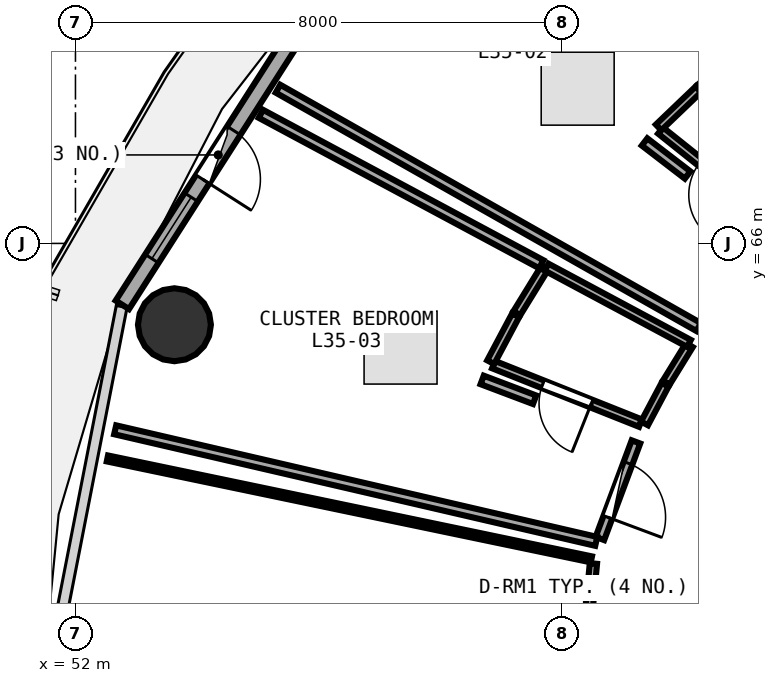
"""IFC4 building model, lengths in metres.
Left out: names, types, materials, properties, quantities, classifications, styles, units other than length and angle.
Written with IfcOpenShell. Run it as: python <this file> out.ifc"""

import sys

from ifc_helpers import new_model, si_unit, direction, frame, frame_2d, origin, origin_2d, place, context, subcontext, project, spatial, rectangle, circle, extrude, element, fill, save


model = new_model("IFC4")
c1 = context("Model", 3, precision=1e-05, world=origin(), true_north=direction((0.0, 1.0)))
c2 = subcontext(c1, "Body", "Model", "MODEL_VIEW")
j1 = project(units=[si_unit("LENGTHUNIT", "METRE"), si_unit("PLANEANGLEUNIT", "RADIAN")], contexts=[c1])
p1 = place(None, origin())
s1 = spatial("IfcSite", under=j1, at=p1, CompositionType="ELEMENT")
p2 = place(p1, origin())
s2 = spatial("IfcBuilding", under=s1, at=p2, CompositionType="ELEMENT")
p3 = place(p2, frame((0.0, 0.0, 139.35)))
s3 = spatial("IfcBuildingStorey", under=s2, at=p3, CompositionType="ELEMENT", Elevation=139.35)
p4 = place(p3, frame((53.627, 64.663, 0.0), z_axis=(0.0, 0.0, 1.0), x_axis=(1.0, 0.0, 0.0)))
e1 = element("IfcColumn", 1, at=p4, inside=s3, PredefinedType="COLUMN", context=c2, shape_type="SweptSolid", body=[
    extrude(circle(Radius=0.6, at=origin_2d()), origin(), (0.0, 0.0, 1.0), 3.75),
])
p5 = place(p3, frame((56.679, 71.1, 0.0), z_axis=(0.0, 0.0, 1.0), x_axis=(-0.538801521808, -0.842432739213, 0.0)))
e2 = element("IfcWall", 2, at=p5, inside=s3, PredefinedType="SOLIDWALL", context=c2, shape_type="SweptSolid", body=[
    extrude(rectangle(XDim=7.253, YDim=0.26, at=frame_2d((3.627, 0.0))), origin(), (0.0, 0.0, 1.0), 3.475),
])
p6 = place(p5, frame((3.852, 0.0, 0.0)))
e3 = element("IfcOpeningElement", 3, at=p6, cuts=e2, PredefinedType="OPENING", context=c2, shape_type="SweptSolid", body=[
    extrude(rectangle(XDim=0.95, YDim=2.1, at=frame_2d((0.475, 1.05))), frame((0.0, 0.14, 0.0), z_axis=(0.0, -1.0, 0.0), x_axis=(1.0, 0.0, 0.0)), (0.0, 0.0, 1.0), 0.28),
])
p7 = place(p5, frame((5.152, 0.0, 0.85)))
e4 = element("IfcOpeningElement", 4, at=p7, cuts=e2, PredefinedType="OPENING", context=c2, shape_type="SweptSolid", body=[
    extrude(rectangle(XDim=1.2, YDim=1.45, at=frame_2d((0.6, 0.725))), frame((0.0, 0.14, 0.0), z_axis=(0.0, -1.0, 0.0), x_axis=(1.0, 0.0, 0.0)), (0.0, 0.0, 1.0), 0.28),
])
p8 = place(p3, frame((63.599, 66.278, 0.0), z_axis=(0.0, 0.0, 1.0), x_axis=(-0.781386491078, 0.624047395284, 0.0)))
e5 = element("IfcWall", 5, at=p8, inside=s3, PredefinedType="PLUMBINGWALL", context=c2, shape_type="SweptSolid", body=[
    extrude(rectangle(XDim=2.529, YDim=0.13, at=frame_2d((1.265, 0.0))), origin(), (0.0, 0.0, 1.0), 2.975),
])
p9 = place(p8, frame((0.835, 0.0, 0.0)))
e6 = element("IfcOpeningElement", 6, at=p9, cuts=e5, PredefinedType="OPENING", context=c2, shape_type="SweptSolid", body=[
    extrude(rectangle(XDim=0.86, YDim=2.05, at=frame_2d((0.43, 1.025))), frame((0.0, 0.075, 0.0), z_axis=(0.0, -1.0, 0.0), x_axis=(1.0, 0.0, 0.0)), (0.0, 0.0, 1.0), 0.15),
])
p10 = place(p3, frame((61.293, 63.044, 0.0), z_axis=(0.0, 0.0, 1.0), x_axis=(-0.929051463741, 0.369950507123, 0.0)))
e7 = element("IfcWall", 7, at=p10, inside=s3, PredefinedType="PLUMBINGWALL", context=c2, shape_type="SweptSolid", body=[
    extrude(rectangle(XDim=2.602, YDim=0.13, at=frame_2d((1.301, 0.0))), origin(), (0.0, 0.0, 1.0), 3.235),
])
p11 = place(p10, frame((0.871, 0.0, 0.0)))
e8 = element("IfcOpeningElement", 8, at=p11, cuts=e7, PredefinedType="OPENING", context=c2, shape_type="SweptSolid", body=[
    extrude(rectangle(XDim=0.86, YDim=2.05, at=frame_2d((0.43, 1.025))), frame((0.0, 0.075, 0.0), z_axis=(0.0, -1.0, 0.0), x_axis=(1.0, 0.0, 0.0)), (0.0, 0.0, 1.0), 0.15),
])
p12 = place(p3, frame((61.218, 62.736, 0.0), z_axis=(0.0, 0.0, 1.0), x_axis=(-0.349718783302, -0.93685472332, 0.0)))
e9 = element("IfcWall", 9, at=p12, inside=s3, PredefinedType="PARTITIONING", context=c2, shape_type="SweptSolid", body=[
    extrude(rectangle(XDim=1.696, YDim=0.15, at=frame_2d((0.848, 0.0))), origin(), (0.0, 0.0, 1.0), 3.235),
])
p13 = place(p12, frame((0.373, 0.0, 0.0)))
e10 = element("IfcOpeningElement", 10, at=p13, cuts=e9, PredefinedType="OPENING", context=c2, shape_type="SweptSolid", body=[
    extrude(rectangle(XDim=0.95, YDim=2.08, at=frame_2d((0.475, 1.04))), frame((0.0, 0.085, 0.0), z_axis=(0.0, -1.0, 0.0), x_axis=(1.0, 0.0, 0.0)), (0.0, 0.0, 1.0), 0.17),
])
p14 = place(p3, frame((60.518, 60.736, 0.0), z_axis=(0.0, 0.0, 1.0), x_axis=(-0.093855600535, -0.995585820634, 0.0)))
e11 = element("IfcWall", 11, at=p14, inside=s3, PredefinedType="PARTITIONING", context=c2, shape_type="SweptSolid", body=[
    extrude(rectangle(XDim=3.408, YDim=0.12, at=frame_2d((1.704, 0.0))), origin(), (0.0, 0.0, 1.0), 2.975),
])
p15 = place(p14, frame((1.254, 0.0, 0.0)))
e12 = element("IfcOpeningElement", 12, at=p15, cuts=e11, PredefinedType="OPENING", context=c2, shape_type="SweptSolid", body=[
    extrude(rectangle(XDim=0.9, YDim=2.08, at=frame_2d((0.45, 1.04))), frame((0.0, 0.07, 0.0), z_axis=(0.0, -1.0, 0.0), x_axis=(1.0, 0.0, 0.0)), (0.0, 0.0, 1.0), 0.14),
])
p16 = place(p3, frame((65.046, 67.523, 0.0), z_axis=(0.0, 0.0, 1.0), x_axis=(-0.683295427563, 0.730142012674, 0.0)))
e13 = element("IfcWall", 13, at=p16, inside=s3, PredefinedType="PARTITIONING", context=c2, shape_type="SweptSolid", body=[
    extrude(rectangle(XDim=7.713, YDim=0.15, at=frame_2d((3.856, 0.0))), origin(), (0.0, 0.0, 1.0), 3.025),
])
p17 = place(p3, frame((61.591, 67.908, 0.0), z_axis=(0.0, 0.0, 1.0), x_axis=(0.722606643047, 0.691259458831, 0.0)))
e14 = element("IfcWall", 14, at=p17, inside=s3, PredefinedType="PLUMBINGWALL", context=c2, shape_type="SweptSolid", body=[
    extrude(rectangle(XDim=0.903, YDim=0.13, at=frame_2d((0.452, 0.0))), origin(), (0.0, 0.0, 1.0), 2.975),
])
p18 = place(p3, frame((62.273, 68.559, 0.0), z_axis=(0.0, 0.0, 1.0), x_axis=(0.763243602663, 0.646110828724, 0.0)))
e15 = element("IfcWall", 15, at=p18, inside=s3, PredefinedType="PLUMBINGWALL", context=c2, shape_type="SweptSolid", body=[
    extrude(rectangle(XDim=0.909, YDim=0.13, at=frame_2d((0.454, 0.0))), origin(), (0.0, 0.0, 1.0), 3.48),
])
p19 = place(p3, frame((62.249, 64.625, 0.0), z_axis=(0.0, 0.0, 1.0), x_axis=(-0.870077493263, 0.492914957896, 0.0)))
e16 = element("IfcWall", 16, at=p19, inside=s3, PredefinedType="PARTITIONING", context=c2, shape_type="SweptSolid", body=[
    extrude(rectangle(XDim=7.952, YDim=0.15, at=frame_2d((3.976, 0.0))), origin(), (0.0, 0.0, 1.0), 2.975),
])
p20 = place(p3, frame((61.36, 67.669, 0.0), z_axis=(0.0, 0.0, 1.0), x_axis=(0.793020417561, -0.609195056884, 0.0)))
e17 = element("IfcWall", 17, at=p20, inside=s3, PredefinedType="PARTITIONING", context=c2, shape_type="SweptSolid", body=[
    extrude(rectangle(XDim=0.893, YDim=0.15, at=frame_2d((0.446, 0.0))), origin(), (0.0, 0.0, 1.0), 3.48),
])
p21 = place(p3, frame((62.097, 64.329, 0.0), z_axis=(0.0, 0.0, 1.0), x_axis=(-0.524547607878, -0.851381117402, 0.0)))
e18 = element("IfcWall", 18, at=p21, inside=s3, PredefinedType="PLUMBINGWALL", context=c2, shape_type="SweptSolid", body=[
    extrude(rectangle(XDim=0.726, YDim=0.13, at=frame_2d((0.363, 0.0))), origin(), (0.0, 0.0, 1.0), 3.48),
])
p22 = place(p3, frame((61.697, 63.676, 0.0), z_axis=(0.0, 0.0, 1.0), x_axis=(-0.469163481751, -0.88311133352, 0.0)))
e19 = element("IfcWall", 19, at=p22, inside=s3, PredefinedType="PLUMBINGWALL", context=c2, shape_type="SweptSolid", body=[
    extrude(rectangle(XDim=0.721, YDim=0.13, at=frame_2d((0.36, 0.0))), origin(), (0.0, 0.0, 1.0), 3.48),
])
p23 = place(p3, frame((58.829, 64.047, 0.0), z_axis=(0.0, 0.0, 1.0), x_axis=(0.469311809042, 0.883032516895, 0.0)))
e20 = element("IfcWall", 20, at=p23, inside=s3, PredefinedType="PLUMBINGWALL", context=c2, shape_type="SweptSolid", body=[
    extrude(rectangle(XDim=0.874, YDim=0.13, at=frame_2d((0.437, 0.0))), origin(), (0.0, 0.0, 1.0), 2.975),
])
p24 = place(p3, frame((59.26, 64.853, 0.0), z_axis=(0.0, 0.0, 1.0), x_axis=(0.524097425664, 0.851658316705, 0.0)))
e21 = element("IfcWall", 21, at=p24, inside=s3, PredefinedType="PLUMBINGWALL", context=c2, shape_type="SweptSolid", body=[
    extrude(rectangle(XDim=0.879, YDim=0.13, at=frame_2d((0.44, 0.0))), origin(), (0.0, 0.0, 1.0), 2.975),
])
p25 = place(p3, frame((59.749, 65.61, 0.0), z_axis=(0.0, 0.0, 1.0), x_axis=(0.881540078275, -0.472109193296, 0.0)))
e22 = element("IfcWall", 22, at=p25, inside=s3, PredefinedType="PLUMBINGWALL", context=c2, shape_type="SweptSolid", body=[
    extrude(rectangle(XDim=2.656, YDim=0.13, at=frame_2d((1.328, 0.0))), origin(), (0.0, 0.0, 1.0), 2.975),
])
p26 = place(p3, frame((60.565, 61.1, 0.0), z_axis=(0.0, 0.0, 1.0), x_axis=(-0.97414388338, 0.225928516292, 0.0)))
e23 = element("IfcWall", 23, at=p26, inside=s3, PredefinedType="PARTITIONING", context=c2, shape_type="SweptSolid", body=[
    extrude(rectangle(XDim=8.122, YDim=0.15, at=frame_2d((4.061, 0.0))), origin(), (0.0, 0.0, 1.0), 3.025),
])
p27 = place(p3, frame((55.049, 68.131, 0.0), z_axis=(0.0, 0.0, 1.0), x_axis=(0.881257916537, -0.472635678447, 0.0)))
e24 = element("IfcWall", 24, at=p27, inside=s3, PredefinedType="PARTITIONING", context=c2, shape_type="SweptSolid", body=[
    extrude(rectangle(XDim=5.233, YDim=0.15, at=frame_2d((2.616, 0.0))), origin(), (0.0, 0.0, 1.0), 3.025),
])
p28 = place(p3, frame((58.688, 63.755, 0.0), z_axis=(0.0, 0.0, 1.0), x_axis=(0.935532386314, -0.353240929336, 0.0)))
e25 = element("IfcWall", 25, at=p28, inside=s3, PredefinedType="PARTITIONING", context=c2, shape_type="SweptSolid", body=[
    extrude(rectangle(XDim=0.922, YDim=0.15, at=frame_2d((0.461, 0.0))), origin(), (0.0, 0.0, 1.0), 3.48),
])
p29 = place(p3, frame((52.525, 62.464, 0.0), z_axis=(0.0, 0.0, 1.0), x_axis=(0.978946183013, -0.204118521367, 0.0)))
e26 = element("IfcWall", 26, at=p29, inside=s3, PredefinedType="PARTITIONING", context=c2, shape_type="SweptSolid", body=[
    extrude(rectangle(XDim=8.131, YDim=0.1, at=frame_2d((4.065, 0.0))), origin(), (0.0, 0.0, 1.0), 3.025),
])
p30 = place(p6, frame((0.95, 0.0, 0.0), z_axis=(0.0, 0.0, 1.0), x_axis=(-1.0, 0.0, 0.0)))
e27 = element("IfcDoor", 27, at=p30, inside=s3, OperationType="SINGLE_SWING_LEFT", PredefinedType="DOOR", context=c2, shape_type="SweptSolid", body=[
    extrude(rectangle(XDim=0.95, YDim=2.1, at=frame_2d((0.475, 1.05))), frame((0.0, 0.025, 0.0), z_axis=(0.0, -1.0, 0.0), x_axis=(1.0, 0.0, 0.0)), (0.0, 0.0, 1.0), 0.05),
])
fill(e3, e27)
p31 = place(p7, origin())
e28 = element("IfcWindow", 28, at=p31, inside=s3, PartitioningType="SINGLE_PANEL", PredefinedType="WINDOW", context=c2, shape_type="SweptSolid", body=[
    extrude(rectangle(XDim=1.2, YDim=1.45, at=frame_2d((0.6, 0.725))), frame((0.0, 0.03, 0.0), z_axis=(0.0, -1.0, 0.0), x_axis=(1.0, 0.0, 0.0)), (0.0, 0.0, 1.0), 0.06),
])
fill(e4, e28)
p32 = place(p11, origin())
e29 = element("IfcDoor", 29, at=p32, inside=s3, OperationType="SINGLE_SWING_LEFT", PredefinedType="DOOR", context=c2, shape_type="SweptSolid", body=[
    extrude(rectangle(XDim=0.86, YDim=2.05, at=frame_2d((0.43, 1.025))), frame((0.0, 0.025, 0.0), z_axis=(0.0, -1.0, 0.0), x_axis=(1.0, 0.0, 0.0)), (0.0, 0.0, 1.0), 0.05),
])
fill(e8, e29)
p33 = place(p13, origin())
e30 = element("IfcDoor", 30, at=p33, inside=s3, OperationType="SINGLE_SWING_RIGHT", PredefinedType="DOOR", context=c2, shape_type="SweptSolid", body=[
    extrude(rectangle(XDim=0.95, YDim=2.08, at=frame_2d((0.475, 1.04))), frame((0.0, 0.025, 0.0), z_axis=(0.0, -1.0, 0.0), x_axis=(1.0, 0.0, 0.0)), (0.0, 0.0, 1.0), 0.05),
])
fill(e10, e30)
save(model, sys.argv[1])
